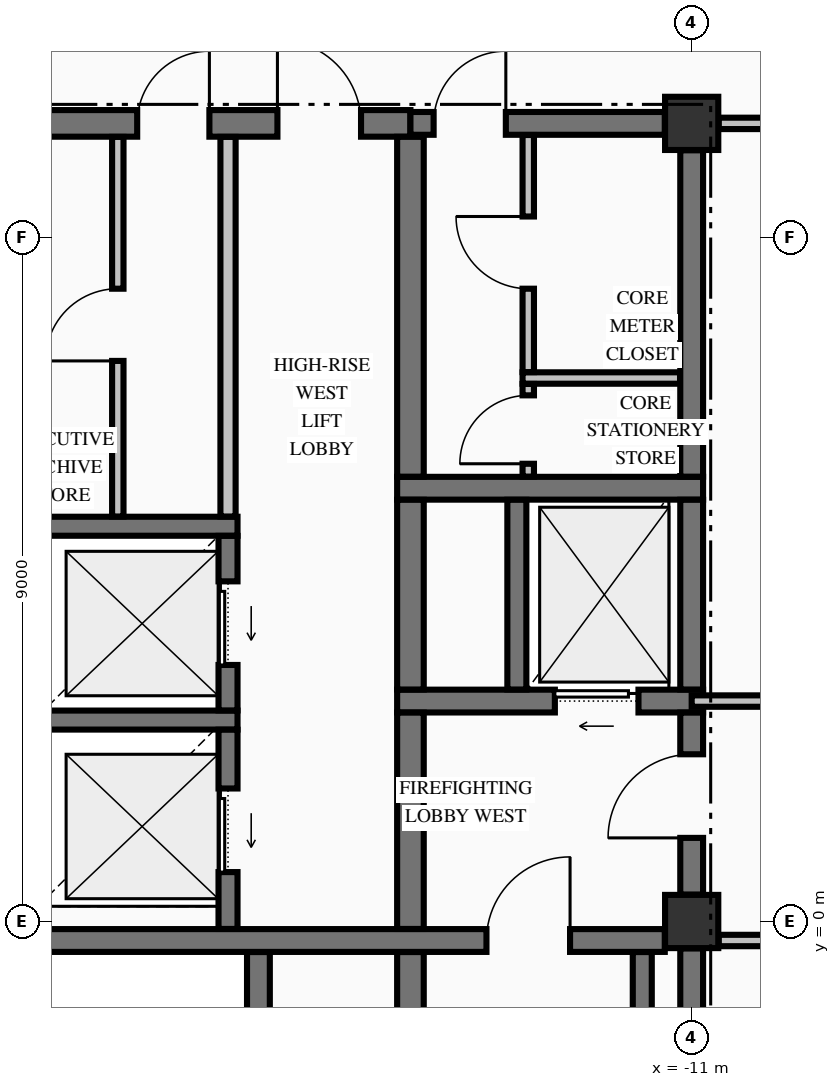
"""IFC4 building model, lengths in metres.
Left out: names, types, materials, properties, quantities, classifications, styles, units other than length and angle.
Written with IfcOpenShell. Run it as: python <this file> out.ifc"""

import sys

from ifc_helpers import new_model, si_unit, direction, frame, frame_2d, origin, origin_2d, place, context, subcontext, project, spatial, rectangle, extrude, element, fill, save


model = new_model("IFC4")
c1 = context("Model", 3, precision=1e-05, world=origin(), true_north=direction((0.0, 1.0)))
c2 = subcontext(c1, "Body", "Model", "MODEL_VIEW")
j1 = project(units=[si_unit("LENGTHUNIT", "METRE"), si_unit("PLANEANGLEUNIT", "RADIAN")], contexts=[c1])
p1 = place(None, origin())
s1 = spatial("IfcSite", under=j1, at=p1, CompositionType="ELEMENT")
p2 = place(p1, origin())
s2 = spatial("IfcBuilding", under=s1, at=p2, CompositionType="ELEMENT")
p3 = place(p2, frame((0.0, 0.0, 260.89)))
s3 = spatial("IfcBuildingStorey", under=s2, at=p3, CompositionType="ELEMENT", Elevation=260.89)
for number, where, z_axis, x_axis in (
    (1, (-11.0, 0.0, -0.25), (0.0, 0.0, 1.0), (1.0, 0.0, 0.0)),
    (2, (-11.0, 10.5, -0.25), (0.0, 0.0, 1.0), (1.0, 0.0, 0.0)),
):
    element("IfcColumn", number, at=place(p3, frame(where, z_axis=z_axis, x_axis=x_axis)), inside=s3, PredefinedType="COLUMN", context=c2, shape_type="SweptSolid", body=[
        extrude(rectangle(XDim=0.7, YDim=0.7, at=origin_2d()), origin(), (0.0, 0.0, 1.0), 3.23),
    ])
p4 = place(p3, frame((-19.646, -0.25, 0.0), z_axis=(0.0, 0.0, 1.0), x_axis=(1.0, 0.0, 0.0)))
e3 = element("IfcWall", 3, at=p4, inside=s3, PredefinedType="SHEAR", context=c2, shape_type="SweptSolid", body=[
    extrude(rectangle(XDim=8.292, YDim=0.3, at=frame_2d((4.146, 0.0))), origin(), (0.0, 0.0, 1.0), 2.98),
])
p5 = place(p4, frame((5.946, 0.0, 0.0)))
e4 = element("IfcOpeningElement", 4, at=p5, cuts=e3, PredefinedType="OPENING", context=c2, shape_type="SweptSolid", body=[
    extrude(rectangle(XDim=1.1, YDim=2.15, at=frame_2d((0.55, 1.075))), frame((0.0, 0.16, 0.0), z_axis=(0.0, -1.0, 0.0), x_axis=(1.0, 0.0, 0.0)), (0.0, 0.0, 1.0), 0.32),
])
p6 = place(p3, frame((-20.175, 2.65, 0.0), z_axis=(0.0, 0.0, 1.0), x_axis=(1.0, 0.0, 0.0)))
e5 = element("IfcWall", 5, at=p6, inside=s3, PredefinedType="SOLIDWALL", context=c2, shape_type="SweptSolid", body=[
    extrude(rectangle(XDim=3.2, YDim=0.25, at=frame_2d((1.6, 0.0))), origin(), (0.0, 0.0, 1.0), 2.98),
])
p7 = place(p3, frame((-14.875, 2.9, 0.0), z_axis=(0.0, 0.0, 1.0), x_axis=(1.0, 0.0, 0.0)))
e6 = element("IfcWall", 6, at=p7, inside=s3, PredefinedType="SHEAR", context=c2, shape_type="SweptSolid", body=[
    extrude(rectangle(XDim=4.025, YDim=0.3, at=frame_2d((2.012, 0.0))), origin(), (0.0, 0.0, 1.0), 2.98),
])
p8 = place(p7, frame((2.075, 0.0, 0.0)))
e7 = element("IfcOpeningElement", 7, at=p8, cuts=e6, PredefinedType="OPENING", context=c2, shape_type="SweptSolid", body=[
    extrude(rectangle(XDim=1.1, YDim=2.2, at=frame_2d((0.55, 1.1))), frame((0.0, 0.16, 0.0), z_axis=(0.0, -1.0, 0.0), x_axis=(1.0, 0.0, 0.0)), (0.0, 0.0, 1.0), 0.32),
])
p9 = place(p3, frame((-20.175, 5.2, 0.0), z_axis=(0.0, 0.0, 1.0), x_axis=(1.0, 0.0, 0.0)))
e8 = element("IfcWall", 8, at=p9, inside=s3, PredefinedType="SOLIDWALL", context=c2, shape_type="SweptSolid", body=[
    extrude(rectangle(XDim=3.2, YDim=0.25, at=frame_2d((1.6, 0.0))), origin(), (0.0, 0.0, 1.0), 2.98),
])
p10 = place(p3, frame((-14.875, 5.7, 0.0), z_axis=(0.0, 0.0, 1.0), x_axis=(1.0, 0.0, 0.0)))
e9 = element("IfcWall", 9, at=p10, inside=s3, PredefinedType="SHEAR", context=c2, shape_type="SweptSolid", body=[
    extrude(rectangle(XDim=4.025, YDim=0.3, at=frame_2d((2.012, 0.0))), origin(), (0.0, 0.0, 1.0), 2.98),
])
p11 = place(p3, frame((-19.646, 10.5, 0.0), z_axis=(0.0, 0.0, 1.0), x_axis=(1.0, 0.0, 0.0)))
e10 = element("IfcWall", 10, at=p11, inside=s3, PredefinedType="SHEAR", context=c2, shape_type="SweptSolid", body=[
    extrude(rectangle(XDim=4.946, YDim=0.35, at=frame_2d((2.473, 0.0))), origin(), (0.0, 0.0, 1.0), 2.98),
])
p12 = place(p11, frame((3.196, 0.0, 0.0)))
e11 = element("IfcOpeningElement", 11, at=p12, cuts=e10, PredefinedType="OPENING", context=c2, shape_type="SweptSolid", body=[
    extrude(rectangle(XDim=1.1, YDim=2.15, at=frame_2d((0.55, 1.075))), frame((0.0, 0.185, 0.0), z_axis=(0.0, -1.0, 0.0), x_axis=(1.0, 0.0, 0.0)), (0.0, 0.0, 1.0), 0.37),
])
p13 = place(p11, frame((1.351, 0.0, 0.0)))
e12 = element("IfcOpeningElement", 12, at=p13, cuts=e10, PredefinedType="OPENING", context=c2, shape_type="SweptSolid", body=[
    extrude(rectangle(XDim=0.95, YDim=2.15, at=frame_2d((0.475, 1.075))), frame((0.0, 0.185, 0.0), z_axis=(0.0, -1.0, 0.0), x_axis=(1.0, 0.0, 0.0)), (0.0, 0.0, 1.0), 0.37),
])
p14 = place(p3, frame((-14.7, 10.5, 0.0), z_axis=(0.0, 0.0, 1.0), x_axis=(1.0, 0.0, 0.0)))
e13 = element("IfcWall", 13, at=p14, inside=s3, PredefinedType="SHEAR", context=c2, shape_type="SweptSolid", body=[
    extrude(rectangle(XDim=3.346, YDim=0.3, at=frame_2d((1.673, 0.0))), origin(), (0.0, 0.0, 1.0), 2.98),
])
p15 = place(p14, frame((0.305, 0.0, 0.0)))
e14 = element("IfcOpeningElement", 14, at=p15, cuts=e13, PredefinedType="OPENING", context=c2, shape_type="SweptSolid", body=[
    extrude(rectangle(XDim=0.95, YDim=2.15, at=frame_2d((0.475, 1.075))), frame((0.0, 0.16, 0.0), z_axis=(0.0, -1.0, 0.0), x_axis=(1.0, 0.0, 0.0)), (0.0, 0.0, 1.0), 0.32),
])
p16 = place(p3, frame((-10.644, -0.25, 0.0), z_axis=(0.0, 0.0, 1.0), x_axis=(1.0, 0.0, 0.0)))
e15 = element("IfcWall", 15, at=p16, inside=s3, PredefinedType="PARTITIONING", context=c2, shape_type="SweptSolid", body=[
    extrude(rectangle(XDim=21.288, YDim=0.15, at=frame_2d((10.644, 0.0))), origin(), (0.0, 0.0, 1.0), 2.98),
])
p17 = place(p16, frame((14.294, 0.0, 0.0)))
e16 = element("IfcOpeningElement", 16, at=p17, cuts=e15, PredefinedType="OPENING", context=c2, shape_type="SweptSolid", body=[
    extrude(rectangle(XDim=1.1, YDim=2.15, at=frame_2d((0.55, 1.075))), frame((0.0, 0.085, 0.0), z_axis=(0.0, -1.0, 0.0), x_axis=(1.0, 0.0, 0.0)), (0.0, 0.0, 1.0), 0.17),
])
p18 = place(p16, frame((6.169, 0.0, 0.0)))
e17 = element("IfcOpeningElement", 17, at=p18, cuts=e15, PredefinedType="OPENING", context=c2, shape_type="SweptSolid", body=[
    extrude(rectangle(XDim=1.05, YDim=2.15, at=frame_2d((0.525, 1.075))), frame((0.0, 0.085, 0.0), z_axis=(0.0, -1.0, 0.0), x_axis=(1.0, 0.0, 0.0)), (0.0, 0.0, 1.0), 0.17),
])
p19 = place(p16, frame((18.319, 0.0, 0.0)))
e18 = element("IfcOpeningElement", 18, at=p19, cuts=e15, PredefinedType="OPENING", context=c2, shape_type="SweptSolid", body=[
    extrude(rectangle(XDim=0.95, YDim=2.15, at=frame_2d((0.475, 1.075))), frame((0.0, 0.085, 0.0), z_axis=(0.0, -1.0, 0.0), x_axis=(1.0, 0.0, 0.0)), (0.0, 0.0, 1.0), 0.17),
])
p20 = place(p3, frame((-11.0, 2.9, 0.0), z_axis=(0.0, 0.0, 1.0), x_axis=(1.0, 0.0, 0.0)))
e19 = element("IfcWall", 19, at=p20, inside=s3, PredefinedType="PARTITIONING", context=c2, shape_type="SweptSolid", body=[
    extrude(rectangle(XDim=22.0, YDim=0.15, at=frame_2d((11.0, 0.0))), origin(), (0.0, 0.0, 1.0), 2.98),
])
p21 = place(p20, frame((14.65, 0.0, 0.0)))
e20 = element("IfcOpeningElement", 20, at=p21, cuts=e19, PredefinedType="OPENING", context=c2, shape_type="SweptSolid", body=[
    extrude(rectangle(XDim=1.1, YDim=2.15, at=frame_2d((0.55, 1.075))), frame((0.0, 0.085, 0.0), z_axis=(0.0, -1.0, 0.0), x_axis=(1.0, 0.0, 0.0)), (0.0, 0.0, 1.0), 0.17),
])
p22 = place(p20, frame((6.525, 0.0, 0.0)))
e21 = element("IfcOpeningElement", 21, at=p22, cuts=e19, PredefinedType="OPENING", context=c2, shape_type="SweptSolid", body=[
    extrude(rectangle(XDim=1.05, YDim=2.15, at=frame_2d((0.525, 1.075))), frame((0.0, 0.085, 0.0), z_axis=(0.0, -1.0, 0.0), x_axis=(1.0, 0.0, 0.0)), (0.0, 0.0, 1.0), 0.17),
])
p23 = place(p20, frame((18.6, 0.0, 0.0)))
e22 = element("IfcOpeningElement", 22, at=p23, cuts=e19, PredefinedType="OPENING", context=c2, shape_type="SweptSolid", body=[
    extrude(rectangle(XDim=1.1, YDim=2.15, at=frame_2d((0.55, 1.075))), frame((0.0, 0.085, 0.0), z_axis=(0.0, -1.0, 0.0), x_axis=(1.0, 0.0, 0.0)), (0.0, 0.0, 1.0), 0.17),
])
p24 = place(p3, frame((-13.225, 7.15, 0.0), z_axis=(0.0, 0.0, 1.0), x_axis=(1.0, 0.0, 0.0)))
e23 = element("IfcWall", 23, at=p24, inside=s3, PredefinedType="PARTITIONING", context=c2, shape_type="SweptSolid", body=[
    extrude(rectangle(XDim=2.072, YDim=0.15, at=frame_2d((1.036, 0.0))), origin(), (0.0, 0.0, 1.0), 2.98),
])
p25 = place(p3, frame((-10.644, 10.5, 0.0), z_axis=(0.0, 0.0, 1.0), x_axis=(1.0, 0.0, 0.0)))
e24 = element("IfcWall", 24, at=p25, inside=s3, PredefinedType="PARTITIONING", context=c2, shape_type="SweptSolid", body=[
    extrude(rectangle(XDim=21.288, YDim=0.15, at=frame_2d((10.644, 0.0))), origin(), (0.0, 0.0, 1.0), 2.98),
])
p26 = place(p25, frame((14.294, 0.0, 0.0)))
e25 = element("IfcOpeningElement", 25, at=p26, cuts=e24, PredefinedType="OPENING", context=c2, shape_type="SweptSolid", body=[
    extrude(rectangle(XDim=1.1, YDim=2.15, at=frame_2d((0.55, 1.075))), frame((0.0, 0.085, 0.0), z_axis=(0.0, -1.0, 0.0), x_axis=(1.0, 0.0, 0.0)), (0.0, 0.0, 1.0), 0.17),
])
p27 = place(p3, frame((-17.1, -0.098, 0.0), z_axis=(0.0, 0.0, 1.0), x_axis=(0.0, 1.0, 0.0)))
e26 = element("IfcWall", 26, at=p27, inside=s3, PredefinedType="SOLIDWALL", context=c2, shape_type="SweptSolid", body=[
    extrude(rectangle(XDim=2.621, YDim=0.25, at=frame_2d((1.311, 0.0))), origin(), (0.0, 0.0, 1.0), 2.98),
])
p28 = place(p27, frame((0.748, 0.0, 0.0)))
e27 = element("IfcOpeningElement", 27, at=p28, cuts=e26, PredefinedType="OPENING", context=c2, shape_type="SweptSolid", body=[
    extrude(rectangle(XDim=1.1, YDim=2.2, at=frame_2d((0.55, 1.1))), frame((0.0, 0.135, 0.0), z_axis=(0.0, -1.0, 0.0), x_axis=(1.0, 0.0, 0.0)), (0.0, 0.0, 1.0), 0.27),
])
p29 = place(p3, frame((-17.1, 2.777, 0.0), z_axis=(0.0, 0.0, 1.0), x_axis=(0.0, 1.0, 0.0)))
e28 = element("IfcWall", 28, at=p29, inside=s3, PredefinedType="SOLIDWALL", context=c2, shape_type="SweptSolid", body=[
    extrude(rectangle(XDim=2.296, YDim=0.25, at=frame_2d((1.148, 0.0))), origin(), (0.0, 0.0, 1.0), 2.98),
])
p30 = place(p29, frame((0.598, 0.0, 0.0)))
e29 = element("IfcOpeningElement", 29, at=p30, cuts=e28, PredefinedType="OPENING", context=c2, shape_type="SweptSolid", body=[
    extrude(rectangle(XDim=1.1, YDim=2.2, at=frame_2d((0.55, 1.1))), frame((0.0, 0.135, 0.0), z_axis=(0.0, -1.0, 0.0), x_axis=(1.0, 0.0, 0.0)), (0.0, 0.0, 1.0), 0.27),
])
p31 = place(p3, frame((-16.7, -9.773, 0.0), z_axis=(0.0, 0.0, 1.0), x_axis=(0.0, 1.0, 0.0)))
e30 = element("IfcWall", 30, at=p31, inside=s3, PredefinedType="SHEAR", context=c2, shape_type="SweptSolid", body=[
    extrude(rectangle(XDim=9.371, YDim=0.3, at=frame_2d((4.686, 0.0))), origin(), (0.0, 0.0, 1.0), 2.98),
])
p32 = place(p3, frame((-14.7, -9.773, 0.0), z_axis=(0.0, 0.0, 1.0), x_axis=(0.0, 1.0, 0.0)))
e31 = element("IfcWall", 31, at=p32, inside=s3, PredefinedType="SHEAR", context=c2, shape_type="SweptSolid", body=[
    extrude(rectangle(XDim=9.371, YDim=0.35, at=frame_2d((4.686, 0.0))), origin(), (0.0, 0.0, 1.0), 2.98),
])
p33 = place(p3, frame((-14.7, -0.098, 0.0), z_axis=(0.0, 0.0, 1.0), x_axis=(0.0, 1.0, 0.0)))
e32 = element("IfcWall", 32, at=p33, inside=s3, PredefinedType="SHEAR", context=c2, shape_type="SweptSolid", body=[
    extrude(rectangle(XDim=2.846, YDim=0.35, at=frame_2d((1.423, 0.0))), origin(), (0.0, 0.0, 1.0), 2.98),
])
p34 = place(p3, frame((-14.7, 3.052, 0.0), z_axis=(0.0, 0.0, 1.0), x_axis=(0.0, 1.0, 0.0)))
e33 = element("IfcWall", 33, at=p34, inside=s3, PredefinedType="SHEAR", context=c2, shape_type="SweptSolid", body=[
    extrude(rectangle(XDim=2.496, YDim=0.35, at=frame_2d((1.248, 0.0))), origin(), (0.0, 0.0, 1.0), 2.98),
])
p35 = place(p3, frame((-14.7, 5.852, 0.0), z_axis=(0.0, 0.0, 1.0), x_axis=(0.0, 1.0, 0.0)))
e34 = element("IfcWall", 34, at=p35, inside=s3, PredefinedType="SHEAR", context=c2, shape_type="SweptSolid", body=[
    extrude(rectangle(XDim=4.471, YDim=0.35, at=frame_2d((2.235, 0.0))), origin(), (0.0, 0.0, 1.0), 2.98),
])
p36 = place(p3, frame((-13.3, 3.052, 0.0), z_axis=(0.0, 0.0, 1.0), x_axis=(0.0, 1.0, 0.0)))
e35 = element("IfcWall", 35, at=p36, inside=s3, PredefinedType="SOLIDWALL", context=c2, shape_type="SweptSolid", body=[
    extrude(rectangle(XDim=2.496, YDim=0.25, at=frame_2d((1.248, 0.0))), origin(), (0.0, 0.0, 1.0), 2.98),
])
p37 = place(p3, frame((-11.65, -9.798, 0.0), z_axis=(0.0, 0.0, 1.0), x_axis=(0.0, 1.0, 0.0)))
e36 = element("IfcWall", 36, at=p37, inside=s3, PredefinedType="SOLIDWALL", context=c2, shape_type="SweptSolid", body=[
    extrude(rectangle(XDim=9.396, YDim=0.25, at=frame_2d((4.698, 0.0))), origin(), (0.0, 0.0, 1.0), 2.98),
])
p38 = place(p3, frame((-11.0, -9.596, 0.0), z_axis=(0.0, 0.0, 1.0), x_axis=(0.0, 1.0, 0.0)))
e37 = element("IfcWall", 37, at=p38, inside=s3, PredefinedType="SHEAR", context=c2, shape_type="SweptSolid", body=[
    extrude(rectangle(XDim=9.242, YDim=0.3, at=frame_2d((4.621, 0.0))), origin(), (0.0, 0.0, 1.0), 2.98),
])
p39 = place(p3, frame((-11.0, 0.354, 0.0), z_axis=(0.0, 0.0, 1.0), x_axis=(0.0, 1.0, 0.0)))
e38 = element("IfcWall", 38, at=p39, inside=s3, PredefinedType="SHEAR", context=c2, shape_type="SweptSolid", body=[
    extrude(rectangle(XDim=2.394, YDim=0.3, at=frame_2d((1.197, 0.0))), origin(), (0.0, 0.0, 1.0), 2.98),
])
p40 = place(p39, frame((0.746, 0.0, 0.0)))
e39 = element("IfcOpeningElement", 39, at=p40, cuts=e38, PredefinedType="OPENING", context=c2, shape_type="SweptSolid", body=[
    extrude(rectangle(XDim=1.1, YDim=2.15, at=frame_2d((0.55, 1.075))), frame((0.0, 0.16, 0.0), z_axis=(0.0, -1.0, 0.0), x_axis=(1.0, 0.0, 0.0)), (0.0, 0.0, 1.0), 0.32),
])
p41 = place(p3, frame((-11.0, 3.052, 0.0), z_axis=(0.0, 0.0, 1.0), x_axis=(0.0, 1.0, 0.0)))
e40 = element("IfcWall", 40, at=p41, inside=s3, PredefinedType="SHEAR", context=c2, shape_type="SweptSolid", body=[
    extrude(rectangle(XDim=2.496, YDim=0.3, at=frame_2d((1.248, 0.0))), origin(), (0.0, 0.0, 1.0), 2.98),
])
p42 = place(p3, frame((-11.0, 5.852, 0.0), z_axis=(0.0, 0.0, 1.0), x_axis=(0.0, 1.0, 0.0)))
e41 = element("IfcWall", 41, at=p42, inside=s3, PredefinedType="SHEAR", context=c2, shape_type="SweptSolid", body=[
    extrude(rectangle(XDim=4.294, YDim=0.3, at=frame_2d((2.147, 0.0))), origin(), (0.0, 0.0, 1.0), 2.98),
])
p43 = place(p3, frame((-18.55, 5.328, 0.0), z_axis=(0.0, 0.0, 1.0), x_axis=(0.0, 1.0, 0.0)))
e42 = element("IfcWall", 42, at=p43, inside=s3, PredefinedType="PARTITIONING", context=c2, shape_type="SweptSolid", body=[
    extrude(rectangle(XDim=4.994, YDim=0.15, at=frame_2d((2.497, 0.0))), origin(), (0.0, 0.0, 1.0), 2.98),
])
p44 = place(p43, frame((2.047, 0.0, 0.0)))
e43 = element("IfcOpeningElement", 43, at=p44, cuts=e42, PredefinedType="OPENING", context=c2, shape_type="SweptSolid", body=[
    extrude(rectangle(XDim=0.95, YDim=2.15, at=frame_2d((0.475, 1.075))), frame((0.0, 0.085, 0.0), z_axis=(0.0, -1.0, 0.0), x_axis=(1.0, 0.0, 0.0)), (0.0, 0.0, 1.0), 0.17),
])
p45 = place(p3, frame((-17.1, 5.328, 0.0), z_axis=(0.0, 0.0, 1.0), x_axis=(0.0, 1.0, 0.0)))
e44 = element("IfcWall", 44, at=p45, inside=s3, PredefinedType="PARTITIONING", context=c2, shape_type="SweptSolid", body=[
    extrude(rectangle(XDim=4.994, YDim=0.2, at=frame_2d((2.497, 0.0))), origin(), (0.0, 0.0, 1.0), 2.98),
])
p46 = place(p3, frame((-13.15, 5.853, 0.0), z_axis=(0.0, 0.0, 1.0), x_axis=(0.0, 1.0, 0.0)))
e45 = element("IfcWall", 45, at=p46, inside=s3, PredefinedType="PARTITIONING", context=c2, shape_type="SweptSolid", body=[
    extrude(rectangle(XDim=1.219, YDim=0.15, at=frame_2d((0.609, 0.0))), origin(), (0.0, 0.0, 1.0), 2.98),
])
p47 = place(p46, frame((0.169, 0.0, 0.0)))
e46 = element("IfcOpeningElement", 46, at=p47, cuts=e45, PredefinedType="OPENING", context=c2, shape_type="SweptSolid", body=[
    extrude(rectangle(XDim=0.9, YDim=2.15, at=frame_2d((0.45, 1.075))), frame((0.0, 0.085, 0.0), z_axis=(0.0, -1.0, 0.0), x_axis=(1.0, 0.0, 0.0)), (0.0, 0.0, 1.0), 0.17),
])
p48 = place(p3, frame((-13.15, 7.228, 0.0), z_axis=(0.0, 0.0, 1.0), x_axis=(0.0, 1.0, 0.0)))
e47 = element("IfcWall", 47, at=p48, inside=s3, PredefinedType="PARTITIONING", context=c2, shape_type="SweptSolid", body=[
    extrude(rectangle(XDim=3.119, YDim=0.15, at=frame_2d((1.56, 0.0))), origin(), (0.0, 0.0, 1.0), 2.98),
])
p49 = place(p48, frame((1.097, 0.0, 0.0)))
e48 = element("IfcOpeningElement", 48, at=p49, cuts=e47, PredefinedType="OPENING", context=c2, shape_type="SweptSolid", body=[
    extrude(rectangle(XDim=0.95, YDim=2.15, at=frame_2d((0.475, 1.075))), frame((0.0, 0.085, 0.0), z_axis=(0.0, -1.0, 0.0), x_axis=(1.0, 0.0, 0.0)), (0.0, 0.0, 1.0), 0.17),
])
p50 = place(p5, origin())
e49 = element("IfcDoor", 49, at=p50, inside=s3, OperationType="SINGLE_SWING_RIGHT", PredefinedType="DOOR", context=c2, shape_type="SweptSolid", body=[
    extrude(rectangle(XDim=1.1, YDim=2.15, at=frame_2d((0.55, 1.075))), frame((0.0, 0.025, 0.0), z_axis=(0.0, -1.0, 0.0), x_axis=(1.0, 0.0, 0.0)), (0.0, 0.0, 1.0), 0.05),
])
fill(e4, e49)
p51 = place(p40, origin())
e50 = element("IfcDoor", 50, at=p51, inside=s3, OperationType="SINGLE_SWING_LEFT", PredefinedType="DOOR", context=c2, shape_type="SweptSolid", body=[
    extrude(rectangle(XDim=1.1, YDim=2.15, at=frame_2d((0.55, 1.075))), frame((0.0, 0.025, 0.0), z_axis=(0.0, -1.0, 0.0), x_axis=(1.0, 0.0, 0.0)), (0.0, 0.0, 1.0), 0.05),
])
fill(e39, e50)
p52 = place(p8, origin())
e51 = element("IfcDoor", 51, at=p52, inside=s3, OperationType="SLIDING_TO_LEFT", PredefinedType="DOOR", context=c2, shape_type="SweptSolid", body=[
    extrude(rectangle(XDim=1.1, YDim=2.2, at=frame_2d((0.55, 1.1))), frame((0.0, 0.025, 0.0), z_axis=(0.0, -1.0, 0.0), x_axis=(1.0, 0.0, 0.0)), (0.0, 0.0, 1.0), 0.05),
])
fill(e7, e51)
p53 = place(p15, origin())
e52 = element("IfcDoor", 52, at=p53, inside=s3, OperationType="SINGLE_SWING_RIGHT", PredefinedType="DOOR", context=c2, shape_type="SweptSolid", body=[
    extrude(rectangle(XDim=0.95, YDim=2.15, at=frame_2d((0.475, 1.075))), frame((0.0, 0.025, 0.0), z_axis=(0.0, -1.0, 0.0), x_axis=(1.0, 0.0, 0.0)), (0.0, 0.0, 1.0), 0.05),
])
fill(e14, e52)
p54 = place(p47, origin())
e53 = element("IfcDoor", 53, at=p54, inside=s3, OperationType="SINGLE_SWING_LEFT", PredefinedType="DOOR", context=c2, shape_type="SweptSolid", body=[
    extrude(rectangle(XDim=0.9, YDim=2.15, at=frame_2d((0.45, 1.075))), frame((0.0, 0.025, 0.0), z_axis=(0.0, -1.0, 0.0), x_axis=(1.0, 0.0, 0.0)), (0.0, 0.0, 1.0), 0.05),
])
fill(e46, e53)
p55 = place(p49, origin())
e54 = element("IfcDoor", 54, at=p55, inside=s3, OperationType="SINGLE_SWING_RIGHT", PredefinedType="DOOR", context=c2, shape_type="SweptSolid", body=[
    extrude(rectangle(XDim=0.95, YDim=2.15, at=frame_2d((0.475, 1.075))), frame((0.0, 0.025, 0.0), z_axis=(0.0, -1.0, 0.0), x_axis=(1.0, 0.0, 0.0)), (0.0, 0.0, 1.0), 0.05),
])
fill(e48, e54)
p56 = place(p28, origin())
e55 = element("IfcDoor", 55, at=p56, inside=s3, OperationType="SLIDING_TO_LEFT", PredefinedType="DOOR", context=c2, shape_type="SweptSolid", body=[
    extrude(rectangle(XDim=1.1, YDim=2.2, at=frame_2d((0.55, 1.1))), frame((0.0, 0.025, 0.0), z_axis=(0.0, -1.0, 0.0), x_axis=(1.0, 0.0, 0.0)), (0.0, 0.0, 1.0), 0.05),
])
fill(e27, e55)
p57 = place(p30, origin())
e56 = element("IfcDoor", 56, at=p57, inside=s3, OperationType="SLIDING_TO_LEFT", PredefinedType="DOOR", context=c2, shape_type="SweptSolid", body=[
    extrude(rectangle(XDim=1.1, YDim=2.2, at=frame_2d((0.55, 1.1))), frame((0.0, 0.025, 0.0), z_axis=(0.0, -1.0, 0.0), x_axis=(1.0, 0.0, 0.0)), (0.0, 0.0, 1.0), 0.05),
])
fill(e29, e56)
p58 = place(p12, origin())
e57 = element("IfcDoor", 57, at=p58, inside=s3, OperationType="SINGLE_SWING_LEFT", PredefinedType="DOOR", context=c2, shape_type="SweptSolid", body=[
    extrude(rectangle(XDim=1.1, YDim=2.15, at=frame_2d((0.55, 1.075))), frame((0.0, 0.025, 0.0), z_axis=(0.0, -1.0, 0.0), x_axis=(1.0, 0.0, 0.0)), (0.0, 0.0, 1.0), 0.05),
])
fill(e11, e57)
p59 = place(p13, origin())
e58 = element("IfcDoor", 58, at=p59, inside=s3, OperationType="SINGLE_SWING_RIGHT", PredefinedType="DOOR", context=c2, shape_type="SweptSolid", body=[
    extrude(rectangle(XDim=0.95, YDim=2.15, at=frame_2d((0.475, 1.075))), frame((0.0, 0.025, 0.0), z_axis=(0.0, -1.0, 0.0), x_axis=(1.0, 0.0, 0.0)), (0.0, 0.0, 1.0), 0.05),
])
fill(e12, e58)
p60 = place(p44, origin())
e59 = element("IfcDoor", 59, at=p60, inside=s3, OperationType="SINGLE_SWING_LEFT", PredefinedType="DOOR", context=c2, shape_type="SweptSolid", body=[
    extrude(rectangle(XDim=0.95, YDim=2.15, at=frame_2d((0.475, 1.075))), frame((0.0, 0.025, 0.0), z_axis=(0.0, -1.0, 0.0), x_axis=(1.0, 0.0, 0.0)), (0.0, 0.0, 1.0), 0.05),
])
fill(e43, e59)
save(model, sys.argv[1])
